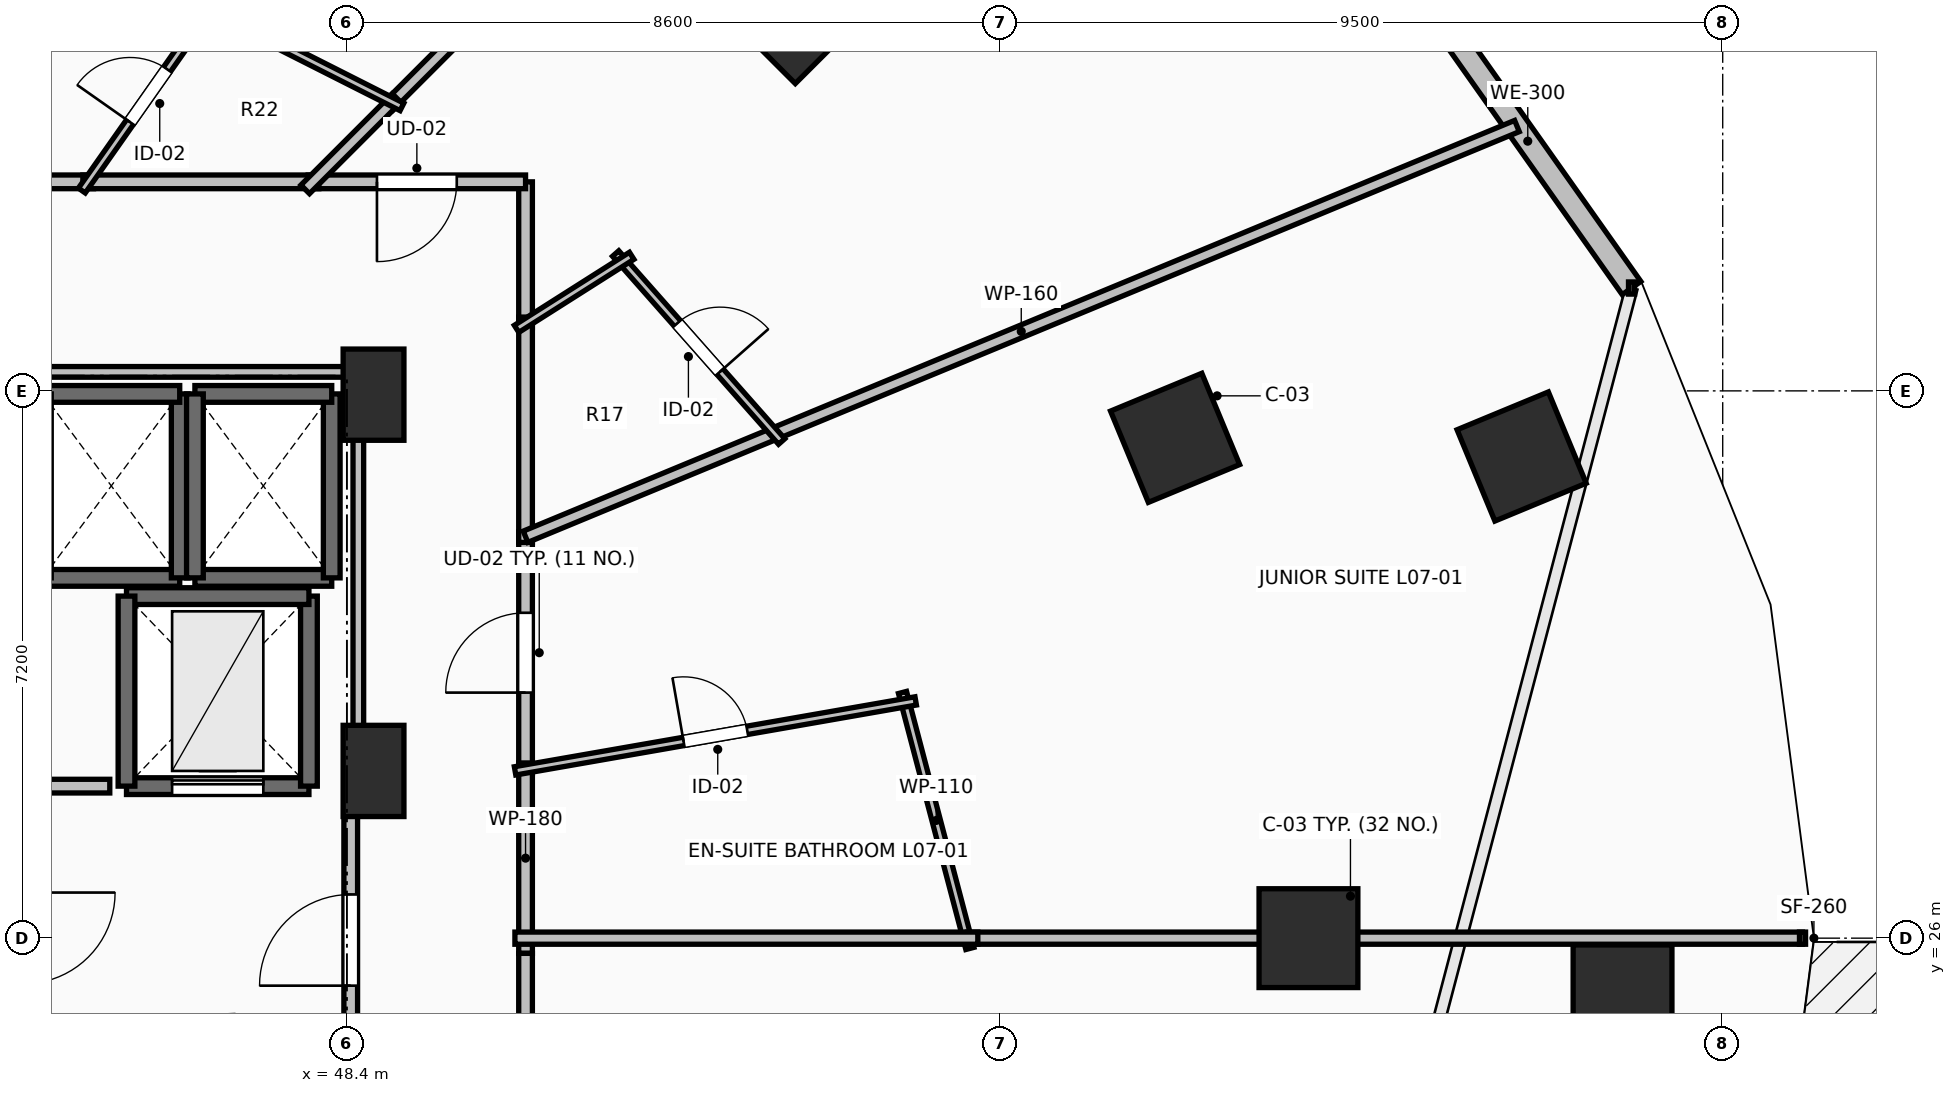
"""IFC4 building model, lengths in metres.
Left out: names, types, materials, properties, quantities, classifications, styles, units other than length and angle.
Written with IfcOpenShell. Run it as: python <this file> out.ifc"""

import sys

from ifc_helpers import new_model, si_unit, direction, frame, frame_2d, origin, origin_2d, place, context, subcontext, project, spatial, rectangle, extrude, element, fill, save


model = new_model("IFC4")
c1 = context("Model", 3, precision=1e-05, world=origin(), true_north=direction((0.0, 1.0)))
c2 = subcontext(c1, "Body", "Model", "MODEL_VIEW")
j1 = project(units=[si_unit("LENGTHUNIT", "METRE"), si_unit("PLANEANGLEUNIT", "RADIAN")], contexts=[c1])
p1 = place(None, origin())
s1 = spatial("IfcSite", under=j1, at=p1, CompositionType="ELEMENT")
p2 = place(p1, origin())
s2 = spatial("IfcBuilding", under=s1, at=p2, CompositionType="ELEMENT")
p3 = place(p2, frame((0.0, 0.0, 31.0)))
s3 = spatial("IfcBuildingStorey", under=s2, at=p3, CompositionType="ELEMENT", Elevation=31.0)
for number, where, z_axis, x_axis in (
    (1, (61.05, 26.0, 0.0), (0.0, 0.0, 1.0), (1.0, 0.0, 0.0)),
    (2, (59.295, 32.582, 0.0), (0.0, 0.0, 1.0), (0.924, 0.383, 0.0)),
    (3, (54.299, 38.162, 0.0), (0.0, 0.0, 1.0), (0.707, 0.707, 0.0)),
    (4, (65.182, 25.261, 0.0), (0.0, 0.0, 1.0), (1.0, 0.0, 0.0)),
    (5, (63.854, 32.337, 0.0), (0.0, 0.0, 1.0), (0.924, 0.383, 0.0)),
):
    element("IfcColumn", number, at=place(p3, frame(where, z_axis=z_axis, x_axis=x_axis)), inside=s3, PredefinedType="COLUMN", context=c2, shape_type="SweptSolid", body=[
        extrude(rectangle(XDim=1.3, YDim=1.3, at=origin_2d()), origin(), (0.0, 0.0, 1.0), 3.5),
    ])
for number, where, z_axis, x_axis in (
    (6, (48.75, 33.15, 0.0), (0.0, 0.0, 1.0), (1.0, 0.0, 0.0)),
    (7, (48.75, 28.2, 0.0), (0.0, 0.0, 1.0), (1.0, 0.0, 0.0)),
):
    element("IfcColumn", number, at=place(p3, frame(where, z_axis=z_axis, x_axis=x_axis)), inside=s3, PredefinedType="PILASTER", context=c2, shape_type="SweptSolid", body=[
        extrude(rectangle(XDim=0.8, YDim=1.2, at=origin_2d()), origin(), (0.0, 0.0, 1.0), 3.5),
    ])
p4 = place(p3, frame((65.301, 34.553, 0.0), z_axis=(0.0, 0.0, 1.0), x_axis=(-0.577130815624, 0.816651713803, 0.0)))
e8 = element("IfcWall", 8, at=p4, inside=s3, PredefinedType="STANDARD", context=c2, shape_type="SweptSolid", body=[
    extrude(rectangle(XDim=4.731, YDim=0.3, at=frame_2d((2.366, 0.0))), origin(), (0.0, 0.0, 1.0), 3.24),
])
p5 = place(p3, frame((44.4, 30.74, 0.0), z_axis=(0.0, 0.0, 1.0), x_axis=(1.0, 0.0, 0.0)))
e9 = element("IfcWall", 9, at=p5, inside=s3, PredefinedType="SOLIDWALL", context=c2, shape_type="SweptSolid", body=[
    extrude(rectangle(XDim=1.8, YDim=0.22, at=frame_2d((0.9, 0.0))), origin(), (0.0, 0.0, 1.0), 3.24),
])
p6 = place(p3, frame((46.2, 30.74, 0.0), z_axis=(0.0, 0.0, 1.0), x_axis=(0.0, 1.0, 0.0)))
e10 = element("IfcWall", 10, at=p6, inside=s3, PredefinedType="SOLIDWALL", context=c2, shape_type="SweptSolid", body=[
    extrude(rectangle(XDim=2.42, YDim=0.22, at=frame_2d((1.21, 0.0))), origin(), (0.0, 0.0, 1.0), 3.24),
])
for number, where, z_axis, x_axis in (
    (11, (46.2, 33.16, 0.0), (0.0, 0.0, 1.0), (-1.0, 0.0, 0.0)),
    (12, (46.4, 30.74, 0.0), (0.0, 0.0, 1.0), (1.0, 0.0, 0.0)),
):
    element("IfcWall", number, at=place(p3, frame(where, z_axis=z_axis, x_axis=x_axis)), inside=s3, PredefinedType="SOLIDWALL", context=c2, shape_type="SweptSolid", body=[
        extrude(rectangle(XDim=1.8, YDim=0.22, at=frame_2d((0.9, 0.0))), origin(), (0.0, 0.0, 1.0), 3.24),
    ])
p7 = place(p3, frame((48.2, 30.74, 0.0), z_axis=(0.0, 0.0, 1.0), x_axis=(0.0, 1.0, 0.0)))
e13 = element("IfcWall", 13, at=p7, inside=s3, PredefinedType="SOLIDWALL", context=c2, shape_type="SweptSolid", body=[
    extrude(rectangle(XDim=2.42, YDim=0.22, at=frame_2d((1.21, 0.0))), origin(), (0.0, 0.0, 1.0), 3.24),
])
p8 = place(p3, frame((48.2, 33.16, 0.0), z_axis=(0.0, 0.0, 1.0), x_axis=(-1.0, 0.0, 0.0)))
e14 = element("IfcWall", 14, at=p8, inside=s3, PredefinedType="SOLIDWALL", context=c2, shape_type="SweptSolid", body=[
    extrude(rectangle(XDim=1.8, YDim=0.22, at=frame_2d((0.9, 0.0))), origin(), (0.0, 0.0, 1.0), 3.24),
])
p9 = place(p3, frame((46.4, 33.16, 0.0), z_axis=(0.0, 0.0, 1.0), x_axis=(0.0, -1.0, 0.0)))
e15 = element("IfcWall", 15, at=p9, inside=s3, PredefinedType="SOLIDWALL", context=c2, shape_type="SweptSolid", body=[
    extrude(rectangle(XDim=2.42, YDim=0.22, at=frame_2d((1.21, 0.0))), origin(), (0.0, 0.0, 1.0), 3.24),
])
p10 = place(p3, frame((45.5, 28.0, 0.0), z_axis=(0.0, 0.0, 1.0), x_axis=(1.0, 0.0, 0.0)))
e16 = element("IfcWall", 16, at=p10, inside=s3, PredefinedType="SHEAR", context=c2, shape_type="SweptSolid", body=[
    extrude(rectangle(XDim=2.4, YDim=0.22, at=frame_2d((1.2, 0.0))), origin(), (0.0, 0.0, 1.0), 3.24),
])
p11 = place(p10, frame((0.6, 0.0, 0.0)))
e17 = element("IfcOpeningElement", 17, at=p11, cuts=e16, PredefinedType="OPENING", context=c2, shape_type="SweptSolid", body=[
    extrude(rectangle(XDim=1.2, YDim=2.2, at=frame_2d((0.6, 1.1))), frame((0.0, 0.125, 0.0), z_axis=(0.0, -1.0, 0.0), x_axis=(1.0, 0.0, 0.0)), (0.0, 0.0, 1.0), 0.25),
])
p12 = place(p3, frame((47.9, 28.0, 0.0), z_axis=(0.0, 0.0, 1.0), x_axis=(0.0, 1.0, 0.0)))
e18 = element("IfcWall", 18, at=p12, inside=s3, PredefinedType="SHEAR", context=c2, shape_type="SweptSolid", body=[
    extrude(rectangle(XDim=2.5, YDim=0.22, at=frame_2d((1.25, 0.0))), origin(), (0.0, 0.0, 1.0), 3.24),
])
p13 = place(p3, frame((47.9, 30.5, 0.0), z_axis=(0.0, 0.0, 1.0), x_axis=(-1.0, 0.0, 0.0)))
e19 = element("IfcWall", 19, at=p13, inside=s3, PredefinedType="SHEAR", context=c2, shape_type="SweptSolid", body=[
    extrude(rectangle(XDim=2.4, YDim=0.22, at=frame_2d((1.2, 0.0))), origin(), (0.0, 0.0, 1.0), 3.24),
])
p14 = place(p3, frame((45.5, 30.5, 0.0), z_axis=(0.0, 0.0, 1.0), x_axis=(0.0, -1.0, 0.0)))
e20 = element("IfcWall", 20, at=p14, inside=s3, PredefinedType="SHEAR", context=c2, shape_type="SweptSolid", body=[
    extrude(rectangle(XDim=2.5, YDim=0.22, at=frame_2d((1.25, 0.0))), origin(), (0.0, 0.0, 1.0), 3.24),
])
p15 = place(p3, frame((48.45, 23.95, 0.0), z_axis=(0.0, 0.0, 1.0), x_axis=(0.0, 1.0, 0.0)))
e21 = element("IfcWall", 21, at=p15, inside=s3, PredefinedType="PARTITIONING", context=c2, shape_type="SweptSolid", body=[
    extrude(rectangle(XDim=4.05, YDim=0.18, at=frame_2d((2.025, 0.0))), origin(), (0.0, 0.0, 1.0), 3.24),
])
p16 = place(p15, frame((1.425, 0.0, 0.0)))
e22 = element("IfcOpeningElement", 22, at=p16, cuts=e21, PredefinedType="OPENING", context=c2, shape_type="SweptSolid", body=[
    extrude(rectangle(XDim=1.2, YDim=2.15, at=frame_2d((0.6, 1.075))), frame((0.0, 0.105, 0.0), z_axis=(0.0, -1.0, 0.0), x_axis=(1.0, 0.0, 0.0)), (0.0, 0.0, 1.0), 0.21),
])
p17 = place(p3, frame((50.75, 28.165, 0.0), z_axis=(0.0, 0.0, 1.0), x_axis=(0.0, 1.0, 0.0)))
e23 = element("IfcWall", 23, at=p17, inside=s3, PredefinedType="PARTITIONING", context=c2, shape_type="SweptSolid", body=[
    extrude(rectangle(XDim=3.181, YDim=0.18, at=frame_2d((1.59, 0.0))), origin(), (0.0, 0.0, 1.0), 3.24),
])
p18 = place(p17, frame((1.065, 0.0, 0.0)))
e24 = element("IfcOpeningElement", 24, at=p18, cuts=e23, PredefinedType="OPENING", context=c2, shape_type="SweptSolid", body=[
    extrude(rectangle(XDim=1.05, YDim=2.2, at=frame_2d((0.525, 1.1))), frame((0.0, 0.105, 0.0), z_axis=(0.0, -1.0, 0.0), x_axis=(1.0, 0.0, 0.0)), (0.0, 0.0, 1.0), 0.21),
])
p19 = place(p3, frame((50.75, 25.8, 0.0), z_axis=(0.0, 0.0, 1.0), x_axis=(0.0, 1.0, 0.0)))
e25 = element("IfcWall", 25, at=p19, inside=s3, PredefinedType="PARTITIONING", context=c2, shape_type="SweptSolid", body=[
    extrude(rectangle(XDim=2.505, YDim=0.18, at=frame_2d((1.252, 0.0))), origin(), (0.0, 0.0, 1.0), 2.432),
])
p20 = place(p3, frame((50.75, 34.031, 0.0), z_axis=(0.0, 0.0, 1.0), x_axis=(0.0, 1.0, 0.0)))
e26 = element("IfcWall", 26, at=p20, inside=s3, PredefinedType="PARTITIONING", context=c2, shape_type="SweptSolid", body=[
    extrude(rectangle(XDim=1.919, YDim=0.18, at=frame_2d((0.959, 0.0))), origin(), (0.0, 0.0, 1.0), 2.432),
])
p21 = place(p3, frame((50.75, 35.95, 0.0), z_axis=(0.0, 0.0, 1.0), x_axis=(-1.0, 0.0, 0.0)))
e27 = element("IfcWall", 27, at=p21, inside=s3, PredefinedType="PARTITIONING", context=c2, shape_type="SweptSolid", body=[
    extrude(rectangle(XDim=2.86, YDim=0.18, at=frame_2d((1.43, 0.0))), origin(), (0.0, 0.0, 1.0), 2.432),
])
p22 = place(p21, frame((0.905, 0.0, 0.0)))
e28 = element("IfcOpeningElement", 28, at=p22, cuts=e27, PredefinedType="OPENING", context=c2, shape_type="SweptSolid", body=[
    extrude(rectangle(XDim=1.05, YDim=2.2, at=frame_2d((0.525, 1.1))), frame((0.0, 0.105, 0.0), z_axis=(0.0, -1.0, 0.0), x_axis=(1.0, 0.0, 0.0)), (0.0, 0.0, 1.0), 0.21),
])
p23 = place(p3, frame((50.75, 31.206, 0.0), z_axis=(0.0, 0.0, 1.0), x_axis=(0.0, 1.0, 0.0)))
e29 = element("IfcWall", 29, at=p23, inside=s3, PredefinedType="PARTITIONING", context=c2, shape_type="SweptSolid", body=[
    extrude(rectangle(XDim=2.965, YDim=0.18, at=frame_2d((1.482, 0.0))), origin(), (0.0, 0.0, 1.0), 2.432),
])
p24 = place(p3, frame((45.066, 35.95, 0.0), z_axis=(0.0, 0.0, 1.0), x_axis=(-1.0, 0.0, 0.0)))
e30 = element("IfcWall", 30, at=p24, inside=s3, PredefinedType="PARTITIONING", context=c2, shape_type="SweptSolid", body=[
    extrude(rectangle(XDim=3.005, YDim=0.18, at=frame_2d((1.502, 0.0))), origin(), (0.0, 0.0, 1.0), 3.24),
])
p25 = place(p24, frame((0.978, 0.0, 0.0)))
e31 = element("IfcOpeningElement", 31, at=p25, cuts=e30, PredefinedType="OPENING", context=c2, shape_type="SweptSolid", body=[
    extrude(rectangle(XDim=1.05, YDim=2.2, at=frame_2d((0.525, 1.1))), frame((0.0, 0.105, 0.0), z_axis=(0.0, -1.0, 0.0), x_axis=(1.0, 0.0, 0.0)), (0.0, 0.0, 1.0), 0.21),
])
p26 = place(p3, frame((48.03, 35.95, 0.0), z_axis=(0.0, 0.0, 1.0), x_axis=(-1.0, 0.0, 0.0)))
e32 = element("IfcWall", 32, at=p26, inside=s3, PredefinedType="PARTITIONING", context=c2, shape_type="SweptSolid", body=[
    extrude(rectangle(XDim=3.104, YDim=0.18, at=frame_2d((1.552, 0.0))), origin(), (0.0, 0.0, 1.0), 2.432),
])
p27 = place(p3, frame((50.75, 14.1, 0.0), z_axis=(0.0, 0.0, 1.0), x_axis=(0.0, 1.0, 0.0)))
e33 = element("IfcWall", 33, at=p27, inside=s3, PredefinedType="PARTITIONING", context=c2, shape_type="SweptSolid", body=[
    extrude(rectangle(XDim=11.7, YDim=0.18, at=frame_2d((5.85, 0.0))), origin(), (0.0, 0.0, 1.0), 2.432),
])
p28 = place(p27, frame((5.35, 0.0, 0.0)))
e34 = element("IfcOpeningElement", 34, at=p28, cuts=e33, PredefinedType="OPENING", context=c2, shape_type="SweptSolid", body=[
    extrude(rectangle(XDim=1.0, YDim=2.15, at=frame_2d((0.5, 1.075))), frame((0.0, 0.105, 0.0), z_axis=(0.0, -1.0, 0.0), x_axis=(1.0, 0.0, 0.0)), (0.0, 0.0, 1.0), 0.21),
])
p29 = place(p3, frame((55.709, 29.232, 0.0), z_axis=(0.0, 0.0, 1.0), x_axis=(0.254476045764, -0.967079077497, 0.0)))
e35 = element("IfcWall", 35, at=p29, inside=s3, PredefinedType="PARTITIONING", context=c2, shape_type="SweptSolid", body=[
    extrude(rectangle(XDim=3.483, YDim=0.11, at=frame_2d((1.741, 0.0))), origin(), (0.0, 0.0, 1.0), 2.432),
])
p30 = place(p3, frame((50.612, 28.201, 0.0), z_axis=(0.0, 0.0, 1.0), x_axis=(0.985100697644, 0.171978532096, 0.0)))
e36 = element("IfcWall", 36, at=p30, inside=s3, PredefinedType="PARTITIONING", context=c2, shape_type="SweptSolid", body=[
    extrude(rectangle(XDim=5.351, YDim=0.11, at=frame_2d((2.675, 0.0))), origin(), (0.0, 0.0, 1.0), 2.922),
])
p31 = place(p30, frame((2.25, 0.0, 0.0)))
e37 = element("IfcOpeningElement", 37, at=p31, cuts=e36, PredefinedType="OPENING", context=c2, shape_type="SweptSolid", body=[
    extrude(rectangle(XDim=0.85, YDim=2.1, at=frame_2d((0.425, 1.05))), frame((0.0, 0.07, 0.0), z_axis=(0.0, -1.0, 0.0), x_axis=(1.0, 0.0, 0.0)), (0.0, 0.0, 1.0), 0.14),
])
p32 = place(p3, frame((63.793, 36.684, 0.0), z_axis=(0.0, 0.0, 1.0), x_axis=(-0.923866969846, -0.382713759914, 0.0)))
e38 = element("IfcWall", 38, at=p32, inside=s3, PredefinedType="PARTITIONING", context=c2, shape_type="SweptSolid", body=[
    extrude(rectangle(XDim=14.118, YDim=0.16, at=frame_2d((7.059, 0.0))), origin(), (0.0, 0.0, 1.0), 2.432),
])
p33 = place(p3, frame((56.56, 26.0, 0.0), z_axis=(0.0, 0.0, 1.0), x_axis=(1.0, 0.0, 0.0)))
e39 = element("IfcWall", 39, at=p33, inside=s3, PredefinedType="PARTITIONING", context=c2, shape_type="SweptSolid", body=[
    extrude(rectangle(XDim=10.989, YDim=0.16, at=frame_2d((5.495, 0.0))), origin(), (0.0, 0.0, 1.0), 2.432),
])
p34 = place(p3, frame((50.61, 26.0, 0.0), z_axis=(0.0, 0.0, 1.0), x_axis=(1.0, 0.0, 0.0)))
e40 = element("IfcWall", 40, at=p34, inside=s3, PredefinedType="PARTITIONING", context=c2, shape_type="SweptSolid", body=[
    extrude(rectangle(XDim=6.09, YDim=0.16, at=frame_2d((3.045, 0.0))), origin(), (0.0, 0.0, 1.0), 2.432),
])
p35 = place(p3, frame((51.935, 35.007, 0.0), z_axis=(0.0, 0.0, 1.0), x_axis=(0.662059609276, -0.749451181709, 0.0)))
e41 = element("IfcWall", 41, at=p35, inside=s3, PredefinedType="PARTITIONING", context=c2, shape_type="SweptSolid", body=[
    extrude(rectangle(XDim=3.299, YDim=0.11, at=frame_2d((1.65, 0.0))), origin(), (0.0, 0.0, 1.0), 2.432),
])
p36 = place(p35, frame((1.225, 0.0, 0.0)))
e42 = element("IfcOpeningElement", 42, at=p36, cuts=e41, PredefinedType="OPENING", context=c2, shape_type="SweptSolid", body=[
    extrude(rectangle(XDim=0.85, YDim=2.1, at=frame_2d((0.425, 1.05))), frame((0.0, 0.07, 0.0), z_axis=(0.0, -1.0, 0.0), x_axis=(1.0, 0.0, 0.0)), (0.0, 0.0, 1.0), 0.14),
])
p37 = place(p3, frame((50.632, 34.016, 0.0), z_axis=(0.0, 0.0, 1.0), x_axis=(0.844361394482, 0.535774052665, 0.0)))
e43 = element("IfcWall", 43, at=p37, inside=s3, PredefinedType="PARTITIONING", context=c2, shape_type="SweptSolid", body=[
    extrude(rectangle(XDim=1.793, YDim=0.11, at=frame_2d((0.897, 0.0))), origin(), (0.0, 0.0, 1.0), 2.922),
])
p38 = place(p3, frame((55.753, 43.753, 0.0), z_axis=(0.0, 0.0, 1.0), x_axis=(-0.707106781187, -0.707106781187, 0.0)))
e44 = element("IfcWall", 44, at=p38, inside=s3, PredefinedType="PARTITIONING", context=c2, shape_type="SweptSolid", body=[
    extrude(rectangle(XDim=9.615, YDim=0.16, at=frame_2d((4.808, 0.0))), origin(), (0.0, 0.0, 1.0), 2.624),
])
p39 = place(p3, frame((49.053, 37.053, 0.0), z_axis=(0.0, 0.0, 1.0), x_axis=(-0.707106781187, -0.707106781187, 0.0)))
e45 = element("IfcWall", 45, at=p39, inside=s3, PredefinedType="PARTITIONING", context=c2, shape_type="SweptSolid", body=[
    extrude(rectangle(XDim=1.7, YDim=0.16, at=frame_2d((0.85, 0.0))), origin(), (0.0, 0.0, 1.0), 2.432),
])
p40 = place(p3, frame((46.462, 38.281, 0.0), z_axis=(0.0, 0.0, 1.0), x_axis=(0.892486842203, -0.451073426944, 0.0)))
e46 = element("IfcWall", 46, at=p40, inside=s3, PredefinedType="PARTITIONING", context=c2, shape_type="SweptSolid", body=[
    extrude(rectangle(XDim=2.982, YDim=0.11, at=frame_2d((1.491, 0.0))), origin(), (0.0, 0.0, 1.0), 2.432),
])
p41 = place(p3, frame((44.913, 35.835, 0.0), z_axis=(0.0, 0.0, 1.0), x_axis=(0.574986040322, 0.818163219312, 0.0)))
e47 = element("IfcWall", 47, at=p41, inside=s3, PredefinedType="PARTITIONING", context=c2, shape_type="SweptSolid", body=[
    extrude(rectangle(XDim=3.052, YDim=0.11, at=frame_2d((1.526, 0.0))), origin(), (0.0, 0.0, 1.0), 2.922),
])
p42 = place(p41, frame((1.101, 0.0, 0.0)))
e48 = element("IfcOpeningElement", 48, at=p42, cuts=e47, PredefinedType="OPENING", context=c2, shape_type="SweptSolid", body=[
    extrude(rectangle(XDim=0.85, YDim=2.1, at=frame_2d((0.425, 1.05))), frame((0.0, 0.07, 0.0), z_axis=(0.0, -1.0, 0.0), x_axis=(1.0, 0.0, 0.0)), (0.0, 0.0, 1.0), 0.14),
])
p43 = place(p3, frame((45.28, 28.0, 0.0), z_axis=(0.0, 0.0, 1.0), x_axis=(-1.0, 0.0, 0.0)))
e49 = element("IfcWall", 49, at=p43, inside=s3, PredefinedType="PARTITIONING", context=c2, shape_type="SweptSolid", body=[
    extrude(rectangle(XDim=0.915, YDim=0.18, at=frame_2d((0.458, 0.0))), origin(), (0.0, 0.0, 1.0), 3.24),
])
p44 = place(p3, frame((44.34, 33.45, 0.0), z_axis=(0.0, 0.0, 1.0), x_axis=(1.0, 0.0, 0.0)))
e50 = element("IfcWall", 50, at=p44, inside=s3, PredefinedType="PARTITIONING", context=c2, shape_type="SweptSolid", body=[
    extrude(rectangle(XDim=4.21, YDim=0.14, at=frame_2d((2.105, 0.0))), origin(), (0.0, 0.0, 1.0), 2.432),
])
p45 = place(p3, frame((48.55, 33.45, 0.0), z_axis=(0.0, 0.0, 1.0), x_axis=(0.0, -1.0, 0.0)))
e51 = element("IfcWall", 51, at=p45, inside=s3, PredefinedType="PARTITIONING", context=c2, shape_type="SweptSolid", body=[
    extrude(rectangle(XDim=5.254, YDim=0.14, at=frame_2d((2.627, 0.0))), origin(), (0.0, 0.0, 1.0), 2.432),
])
p46 = place(p11, origin())
e52 = element("IfcDoor", 52, at=p46, inside=s3, OperationType="SLIDING_TO_LEFT", PredefinedType="DOOR", context=c2, shape_type="SweptSolid", body=[
    extrude(rectangle(XDim=1.2, YDim=2.2, at=frame_2d((0.6, 1.1))), frame((0.0, 0.025, 0.0), z_axis=(0.0, -1.0, 0.0), x_axis=(1.0, 0.0, 0.0)), (0.0, 0.0, 1.0), 0.05),
])
fill(e17, e52)
p47 = place(p16, origin())
e53 = element("IfcDoor", 53, at=p47, inside=s3, OperationType="SINGLE_SWING_LEFT", PredefinedType="DOOR", context=c2, shape_type="SweptSolid", body=[
    extrude(rectangle(XDim=1.2, YDim=2.15, at=frame_2d((0.6, 1.075))), frame((0.0, 0.025, 0.0), z_axis=(0.0, -1.0, 0.0), x_axis=(1.0, 0.0, 0.0)), (0.0, 0.0, 1.0), 0.05),
])
fill(e22, e53)
p48 = place(p18, origin())
e54 = element("IfcDoor", 54, at=p48, inside=s3, OperationType="SINGLE_SWING_LEFT", PredefinedType="DOOR", context=c2, shape_type="SweptSolid", body=[
    extrude(rectangle(XDim=1.05, YDim=2.2, at=frame_2d((0.525, 1.1))), frame((0.0, 0.025, 0.0), z_axis=(0.0, -1.0, 0.0), x_axis=(1.0, 0.0, 0.0)), (0.0, 0.0, 1.0), 0.05),
])
fill(e24, e54)
p49 = place(p22, origin())
e55 = element("IfcDoor", 55, at=p49, inside=s3, OperationType="SINGLE_SWING_RIGHT", PredefinedType="DOOR", context=c2, shape_type="SweptSolid", body=[
    extrude(rectangle(XDim=1.05, YDim=2.2, at=frame_2d((0.525, 1.1))), frame((0.0, 0.025, 0.0), z_axis=(0.0, -1.0, 0.0), x_axis=(1.0, 0.0, 0.0)), (0.0, 0.0, 1.0), 0.05),
])
fill(e28, e55)
p50 = place(p31, origin())
e56 = element("IfcDoor", 56, at=p50, inside=s3, OperationType="SINGLE_SWING_LEFT", PredefinedType="DOOR", context=c2, shape_type="SweptSolid", body=[
    extrude(rectangle(XDim=0.85, YDim=2.1, at=frame_2d((0.425, 1.05))), frame((0.0, 0.025, 0.0), z_axis=(0.0, -1.0, 0.0), x_axis=(1.0, 0.0, 0.0)), (0.0, 0.0, 1.0), 0.05),
])
fill(e37, e56)
p51 = place(p36, origin())
e57 = element("IfcDoor", 57, at=p51, inside=s3, OperationType="SINGLE_SWING_RIGHT", PredefinedType="DOOR", context=c2, shape_type="SweptSolid", body=[
    extrude(rectangle(XDim=0.85, YDim=2.1, at=frame_2d((0.425, 1.05))), frame((0.0, 0.025, 0.0), z_axis=(0.0, -1.0, 0.0), x_axis=(1.0, 0.0, 0.0)), (0.0, 0.0, 1.0), 0.05),
])
fill(e42, e57)
p52 = place(p42, origin())
e58 = element("IfcDoor", 58, at=p52, inside=s3, OperationType="SINGLE_SWING_LEFT", PredefinedType="DOOR", context=c2, shape_type="SweptSolid", body=[
    extrude(rectangle(XDim=0.85, YDim=2.1, at=frame_2d((0.425, 1.05))), frame((0.0, 0.025, 0.0), z_axis=(0.0, -1.0, 0.0), x_axis=(1.0, 0.0, 0.0)), (0.0, 0.0, 1.0), 0.05),
])
fill(e48, e58)
save(model, sys.argv[1])
